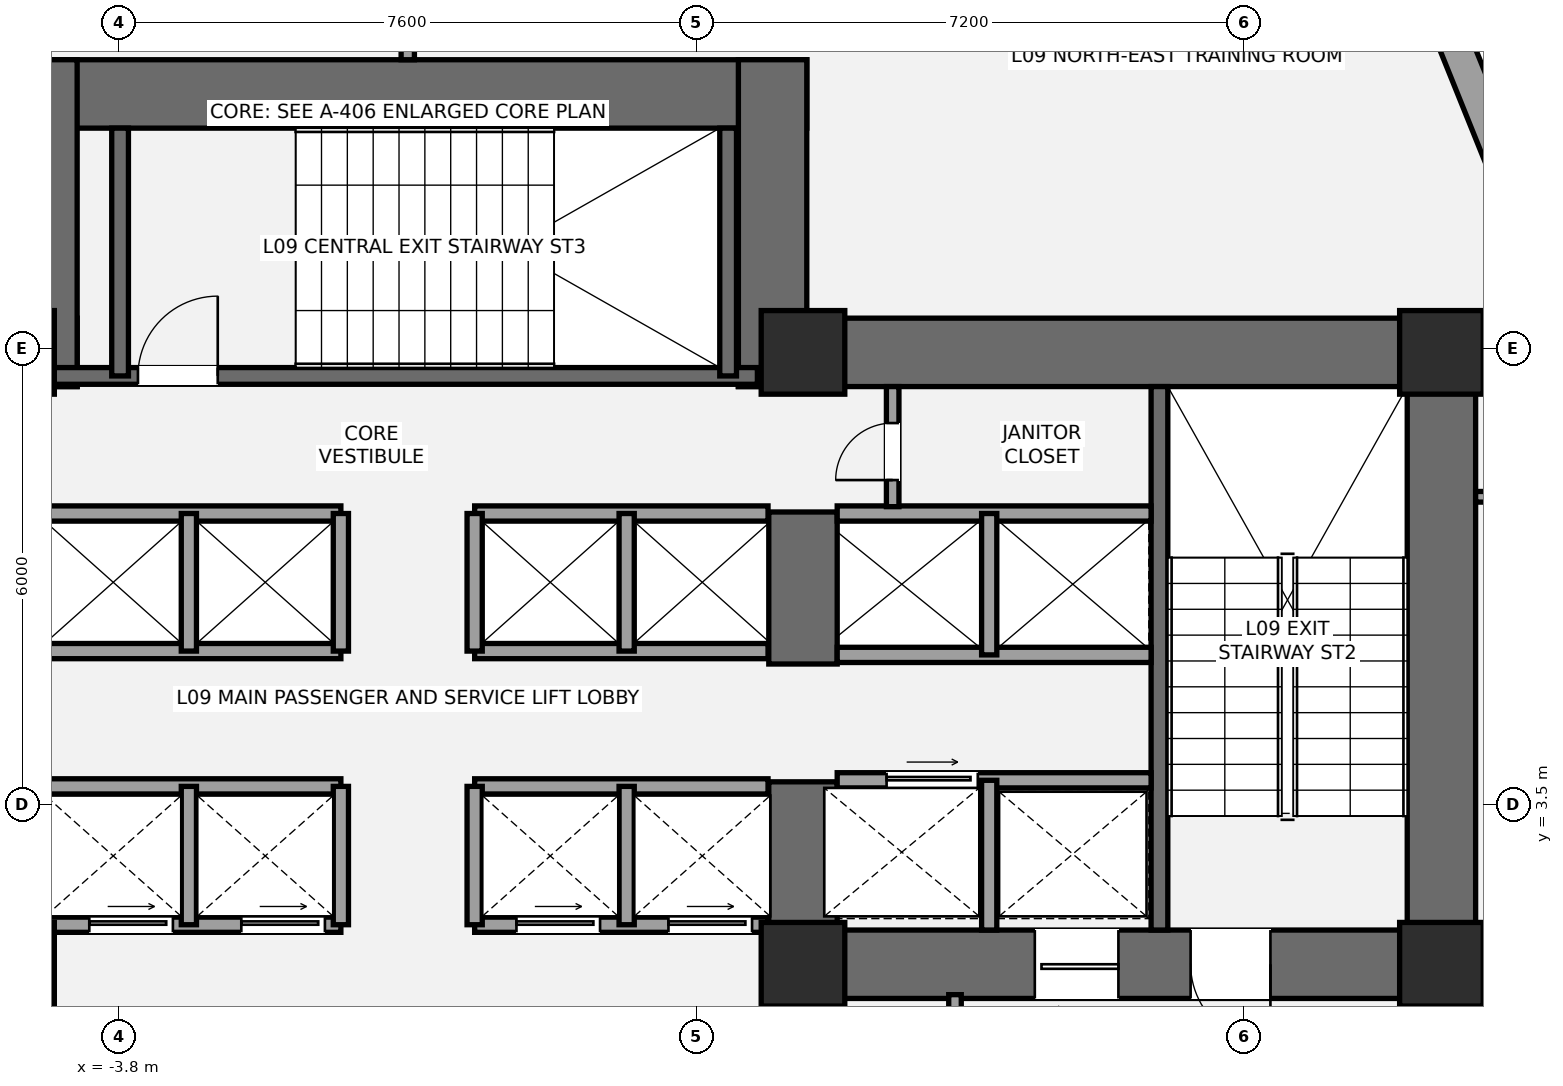
"""IFC4 building model, lengths in metres.
Left out: names, types, materials, properties, quantities, classifications, styles, units other than length and angle.
Written with IfcOpenShell. Run it as: python <this file> out.ifc"""

import sys

from ifc_helpers import new_model, si_unit, direction, frame, frame_2d, origin, origin_2d, place, context, subcontext, project, spatial, rectangle, extrude, element, fill, save


model = new_model("IFC4")
c1 = context("Model", 3, precision=1e-05, world=origin(), true_north=direction((0.0, 1.0)))
c2 = subcontext(c1, "Body", "Model", "MODEL_VIEW")
j1 = project(units=[si_unit("LENGTHUNIT", "METRE"), si_unit("PLANEANGLEUNIT", "RADIAN")], contexts=[c1])
p1 = place(None, origin())
s1 = spatial("IfcSite", under=j1, at=p1, CompositionType="ELEMENT")
p2 = place(p1, origin())
s2 = spatial("IfcBuilding", under=s1, at=p2, CompositionType="ELEMENT")
p3 = place(p2, frame((0.0, 0.0, 37.8)))
s3 = spatial("IfcBuildingStorey", under=s2, at=p3, CompositionType="ELEMENT", Elevation=37.8)
p4 = place(p3, frame((-14.05, 9.45, 0.0), z_axis=(0.0, 0.0, 1.0), x_axis=(1.0, 0.0, 0.0)))
e1 = element("IfcWall", 1, at=p4, inside=s3, PredefinedType="SHEAR", context=c2, shape_type="SweptSolid", body=[
    extrude(rectangle(XDim=9.7, YDim=0.9, at=frame_2d((4.85, 0.0))), origin(), (0.0, 0.0, 1.0), 3.6),
])
p5 = place(p3, frame((13.6, 0.95, 0.0), z_axis=(0.0, 0.0, 1.0), x_axis=(0.0, 1.0, 0.0)))
e2 = element("IfcWall", 2, at=p5, inside=s3, PredefinedType="SHEAR", context=c2, shape_type="SweptSolid", body=[
    extrude(rectangle(XDim=8.95, YDim=0.9, at=frame_2d((4.475, 0.0))), origin(), (0.0, 0.0, 1.0), 3.6),
])
p6 = place(p3, frame((4.35, 9.45, 0.0), z_axis=(0.0, 0.0, 1.0), x_axis=(1.0, 0.0, 0.0)))
e3 = element("IfcWall", 3, at=p6, inside=s3, PredefinedType="SHEAR", context=c2, shape_type="SweptSolid", body=[
    extrude(rectangle(XDim=9.7, YDim=0.9, at=frame_2d((4.85, 0.0))), origin(), (0.0, 0.0, 1.0), 3.6),
])
p7 = place(p3, frame((14.05, 1.4, 0.0), z_axis=(0.0, 0.0, 1.0), x_axis=(-1.0, 0.0, 0.0)))
e4 = element("IfcWall", 4, at=p7, inside=s3, PredefinedType="SHEAR", context=c2, shape_type="SweptSolid", body=[
    extrude(rectangle(XDim=9.3, YDim=0.9, at=frame_2d((4.65, 0.0))), origin(), (0.0, 0.0, 1.0), 3.6),
])
p8 = place(p7, frame((2.7, 0.0, 0.0)))
e5 = element("IfcOpeningElement", 5, at=p8, cuts=e4, PredefinedType="OPENING", context=c2, shape_type="SweptSolid", body=[
    extrude(rectangle(XDim=1.05, YDim=2.15, at=frame_2d((0.525, 1.075))), frame((0.0, 0.46, 0.0), z_axis=(0.0, -1.0, 0.0), x_axis=(1.0, 0.0, 0.0)), (0.0, 0.0, 1.0), 0.92),
])
p9 = place(p7, frame((4.7, 0.0, 0.0)))
e6 = element("IfcOpeningElement", 6, at=p9, cuts=e4, PredefinedType="OPENING", context=c2, shape_type="SweptSolid", body=[
    extrude(rectangle(XDim=1.1, YDim=2.2, at=frame_2d((0.55, 1.1))), frame((0.0, 0.46, 0.0), z_axis=(0.0, -1.0, 0.0), x_axis=(1.0, 0.0, 0.0)), (0.0, 0.0, 1.0), 0.92),
])
p10 = place(p3, frame((5.2, 0.95, 0.0), z_axis=(0.0, 0.0, 1.0), x_axis=(0.0, 1.0, 0.0)))
e7 = element("IfcWall", 7, at=p10, inside=s3, PredefinedType="SHEAR", context=c2, shape_type="SweptSolid", body=[
    extrude(rectangle(XDim=2.85, YDim=0.9, at=frame_2d((1.425, 0.0))), origin(), (0.0, 0.0, 1.0), 3.6),
])
p11 = place(p3, frame((5.2, 5.35, 0.0), z_axis=(0.0, 0.0, 1.0), x_axis=(0.0, 1.0, 0.0)))
e8 = element("IfcWall", 8, at=p11, inside=s3, PredefinedType="SHEAR", context=c2, shape_type="SweptSolid", body=[
    extrude(rectangle(XDim=2.0, YDim=0.9, at=frame_2d((1.0, 0.0))), origin(), (0.0, 0.0, 1.0), 3.6),
])
p12 = place(p3, frame((9.89, 1.85, 0.0), z_axis=(0.0, 0.0, 1.0), x_axis=(0.0, 1.0, 0.0)))
e9 = element("IfcWall", 9, at=p12, inside=s3, PredefinedType="SHEAR", context=c2, shape_type="SweptSolid", body=[
    extrude(rectangle(XDim=7.15, YDim=0.22, at=frame_2d((3.575, 0.0))), origin(), (0.0, 0.0, 1.0), 3.6),
])
p13 = place(p3, frame((-5.25, 12.85, 0.0), z_axis=(0.0, 0.0, 1.0), x_axis=(1.0, 0.0, 0.0)))
e10 = element("IfcWall", 10, at=p13, inside=s3, PredefinedType="SHEAR", context=c2, shape_type="SweptSolid", body=[
    extrude(rectangle(XDim=10.5, YDim=0.9, at=frame_2d((5.25, 0.0))), origin(), (0.0, 0.0, 1.0), 3.6),
])
for number, where, z_axis, x_axis in (
    (11, (-4.8, 9.0, 0.0), (0.0, 0.0, 1.0), (0.0, 1.0, 0.0)),
    (12, (4.8, 9.0, 0.0), (0.0, 0.0, 1.0), (0.0, 1.0, 0.0)),
):
    element("IfcWall", number, at=place(p3, frame(where, z_axis=z_axis, x_axis=x_axis)), inside=s3, PredefinedType="SHEAR", context=c2, shape_type="SweptSolid", body=[
        extrude(rectangle(XDim=4.3, YDim=0.9, at=frame_2d((2.15, 0.0))), origin(), (0.0, 0.0, 1.0), 3.6),
    ])
p14 = place(p3, frame((-4.7, 9.14, 0.0), z_axis=(0.0, 0.0, 1.0), x_axis=(1.0, 0.0, 0.0)))
e13 = element("IfcWall", 13, at=p14, inside=s3, PredefinedType="SHEAR", context=c2, shape_type="SweptSolid", body=[
    extrude(rectangle(XDim=9.3, YDim=0.22, at=frame_2d((4.65, 0.0))), origin(), (0.0, 0.0, 1.0), 3.6),
])
p15 = place(p14, frame((1.15, 0.0, 0.0)))
e14 = element("IfcOpeningElement", 14, at=p15, cuts=e13, PredefinedType="OPENING", context=c2, shape_type="SweptSolid", body=[
    extrude(rectangle(XDim=1.05, YDim=2.15, at=frame_2d((0.525, 1.075))), frame((0.0, 0.12, 0.0), z_axis=(0.0, -1.0, 0.0), x_axis=(1.0, 0.0, 0.0)), (0.0, 0.0, 1.0), 0.24),
])
for number, where, z_axis, x_axis in (
    (15, (-3.785, 9.14, 0.0), (0.0, 0.0, 1.0), (0.0, 1.0, 0.0)),
    (16, (4.215, 9.14, 0.0), (0.0, 0.0, 1.0), (0.0, 1.0, 0.0)),
):
    element("IfcWall", number, at=place(p3, frame(where, z_axis=z_axis, x_axis=x_axis)), inside=s3, PredefinedType="SHEAR", context=c2, shape_type="SweptSolid", body=[
        extrude(rectangle(XDim=3.26, YDim=0.22, at=frame_2d((1.63, 0.0))), origin(), (0.0, 0.0, 1.0), 3.6),
    ])
for number, where, z_axis, x_axis in (
    (17, (-5.2, 1.4, 0.0), (0.0, 0.0, 1.0), (1.0, 0.0, 0.0)),
    (18, (-5.2, 9.45, 0.0), (0.0, 0.0, 1.0), (1.0, 0.0, 0.0)),
    (19, (5.2, 1.4, 0.0), (0.0, 0.0, 1.0), (1.0, 0.0, 0.0)),
    (20, (5.2, 9.45, 0.0), (0.0, 0.0, 1.0), (1.0, 0.0, 0.0)),
    (21, (13.6, 1.4, 0.0), (0.0, 0.0, 1.0), (1.0, 0.0, 0.0)),
    (22, (13.6, 9.45, 0.0), (0.0, 0.0, 1.0), (1.0, 0.0, 0.0)),
):
    element("IfcColumn", number, at=place(p3, frame(where, z_axis=z_axis, x_axis=x_axis)), inside=s3, PredefinedType="COLUMN", context=c2, shape_type="SweptSolid", body=[
        extrude(rectangle(XDim=1.1, YDim=1.1, at=origin_2d()), origin(), (0.0, 0.0, 1.0), 3.6),
    ])
p16 = place(p3, frame((12.681, 16.247, 0.0), z_axis=(0.0, 0.0, 1.0), x_axis=(0.373950808571, -0.927448539149, 0.0)))
e23 = element("IfcWall", 23, at=p16, inside=s3, PredefinedType="STANDARD", context=c2, shape_type="SweptSolid", body=[
    extrude(rectangle(XDim=4.831, YDim=0.44, at=frame_2d((2.416, 0.0))), origin(), (0.0, 0.0, 1.0), 2.533),
])
p17 = place(p3, frame((7.2, -2.15, 0.0), z_axis=(0.0, 0.0, 1.0), x_axis=(0.0, 1.0, 0.0)))
e24 = element("IfcWall", 24, at=p17, inside=s3, PredefinedType="PARTITIONING", context=c2, shape_type="SweptSolid", body=[
    extrude(rectangle(XDim=3.15, YDim=0.165, at=frame_2d((1.575, 0.0))), origin(), (0.0, 0.0, 1.0), 2.853),
])
p18 = place(p3, frame((13.45, -2.15, 0.0), z_axis=(0.0, 0.0, 1.0), x_axis=(0.0, 1.0, 0.0)))
e25 = element("IfcWall", 25, at=p18, inside=s3, PredefinedType="PARTITIONING", context=c2, shape_type="SweptSolid", body=[
    extrude(rectangle(XDim=3.15, YDim=0.165, at=frame_2d((1.575, 0.0))), origin(), (0.0, 0.0, 1.0), 2.853),
])
p19 = place(p18, frame((1.15, 0.0, 0.0)))
e26 = element("IfcOpeningElement", 26, at=p19, cuts=e25, PredefinedType="OPENING", context=c2, shape_type="SweptSolid", body=[
    extrude(rectangle(XDim=1.05, YDim=2.15, at=frame_2d((0.525, 1.075))), frame((0.0, 0.093, 0.0), z_axis=(0.0, -1.0, 0.0), x_axis=(1.0, 0.0, 0.0)), (0.0, 0.0, 1.0), 0.185),
])
p20 = place(p3, frame((4.95, -2.15, 0.0), z_axis=(0.0, 0.0, 1.0), x_axis=(0.0, 1.0, 0.0)))
e27 = element("IfcWall", 27, at=p20, inside=s3, PredefinedType="SOLIDWALL", context=c2, shape_type="SweptSolid", body=[
    extrude(rectangle(XDim=3.15, YDim=0.2, at=frame_2d((1.575, 0.0))), origin(), (0.0, 0.0, 1.0), 3.4),
])
p21 = place(p20, frame((0.95, 0.0, 0.0)))
e28 = element("IfcOpeningElement", 28, at=p21, cuts=e27, PredefinedType="OPENING", context=c2, shape_type="SweptSolid", body=[
    extrude(rectangle(XDim=0.75, YDim=2.1, at=frame_2d((0.375, 1.05))), frame((0.0, 0.11, 0.0), z_axis=(0.0, -1.0, 0.0), x_axis=(1.0, 0.0, 0.0)), (0.0, 0.0, 1.0), 0.22),
])
p22 = place(p3, frame((5.65, 3.82, 0.0), z_axis=(0.0, 0.0, 1.0), x_axis=(1.0, 0.0, 0.0)))
e29 = element("IfcWall", 29, at=p22, inside=s3, PredefinedType="SOLIDWALL", context=c2, shape_type="SweptSolid", body=[
    extrude(rectangle(XDim=4.13, YDim=0.2, at=frame_2d((2.065, 0.0))), origin(), (0.0, 0.0, 1.0), 3.4),
])
p23 = place(p22, frame((0.65, 0.0, 0.0)))
e30 = element("IfcOpeningElement", 30, at=p23, cuts=e29, PredefinedType="OPENING", context=c2, shape_type="SweptSolid", body=[
    extrude(rectangle(XDim=1.2, YDim=2.2, at=frame_2d((0.6, 1.1))), frame((0.0, 0.11, 0.0), z_axis=(0.0, -1.0, 0.0), x_axis=(1.0, 0.0, 0.0)), (0.0, 0.0, 1.0), 0.22),
])
p24 = place(p3, frame((7.65, 1.85, 0.0), z_axis=(0.0, 0.0, 1.0), x_axis=(0.0, 1.0, 0.0)))
e31 = element("IfcWall", 31, at=p24, inside=s3, PredefinedType="SOLIDWALL", context=c2, shape_type="SweptSolid", body=[
    extrude(rectangle(XDim=1.97, YDim=0.2, at=frame_2d((0.985, 0.0))), origin(), (0.0, 0.0, 1.0), 3.4),
])
for number, where, z_axis, x_axis in (
    (32, (5.65, 5.47, 0.0), (0.0, 0.0, 1.0), (1.0, 0.0, 0.0)),
    (33, (5.65, 7.33, 0.0), (0.0, 0.0, 1.0), (1.0, 0.0, 0.0)),
):
    element("IfcWall", number, at=place(p3, frame(where, z_axis=z_axis, x_axis=x_axis)), inside=s3, PredefinedType="SOLIDWALL", context=c2, shape_type="SweptSolid", body=[
        extrude(rectangle(XDim=4.13, YDim=0.2, at=frame_2d((2.065, 0.0))), origin(), (0.0, 0.0, 1.0), 3.4),
    ])
p25 = place(p3, frame((7.65, 5.47, 0.0), z_axis=(0.0, 0.0, 1.0), x_axis=(0.0, 1.0, 0.0)))
e34 = element("IfcWall", 34, at=p25, inside=s3, PredefinedType="SOLIDWALL", context=c2, shape_type="SweptSolid", body=[
    extrude(rectangle(XDim=1.86, YDim=0.2, at=frame_2d((0.93, 0.0))), origin(), (0.0, 0.0, 1.0), 3.4),
])
p26 = place(p3, frame((-4.74, 1.92, 0.0), z_axis=(0.0, 0.0, 1.0), x_axis=(1.0, 0.0, 0.0)))
e35 = element("IfcWall", 35, at=p26, inside=s3, PredefinedType="SOLIDWALL", context=c2, shape_type="SweptSolid", body=[
    extrude(rectangle(XDim=3.86, YDim=0.2, at=frame_2d((1.93, 0.0))), origin(), (0.0, 0.0, 1.0), 2.39),
])
p27 = place(p26, frame((0.55, 0.0, 0.0)))
e36 = element("IfcOpeningElement", 36, at=p27, cuts=e35, PredefinedType="OPENING", context=c2, shape_type="SweptSolid", body=[
    extrude(rectangle(XDim=1.1, YDim=2.2, at=frame_2d((0.55, 1.1))), frame((0.0, 0.11, 0.0), z_axis=(0.0, -1.0, 0.0), x_axis=(1.0, 0.0, 0.0)), (0.0, 0.0, 1.0), 0.22),
])
p28 = place(p26, frame((2.55, 0.0, 0.0)))
e37 = element("IfcOpeningElement", 37, at=p28, cuts=e35, PredefinedType="OPENING", context=c2, shape_type="SweptSolid", body=[
    extrude(rectangle(XDim=1.1, YDim=2.2, at=frame_2d((0.55, 1.1))), frame((0.0, 0.11, 0.0), z_axis=(0.0, -1.0, 0.0), x_axis=(1.0, 0.0, 0.0)), (0.0, 0.0, 1.0), 0.22),
])
p29 = place(p3, frame((0.88, 1.92, 0.0), z_axis=(0.0, 0.0, 1.0), x_axis=(1.0, 0.0, 0.0)))
e38 = element("IfcWall", 38, at=p29, inside=s3, PredefinedType="SOLIDWALL", context=c2, shape_type="SweptSolid", body=[
    extrude(rectangle(XDim=3.86, YDim=0.2, at=frame_2d((1.93, 0.0))), origin(), (0.0, 0.0, 1.0), 2.39),
])
p30 = place(p29, frame((0.55, 0.0, 0.0)))
e39 = element("IfcOpeningElement", 39, at=p30, cuts=e38, PredefinedType="OPENING", context=c2, shape_type="SweptSolid", body=[
    extrude(rectangle(XDim=1.1, YDim=2.2, at=frame_2d((0.55, 1.1))), frame((0.0, 0.11, 0.0), z_axis=(0.0, -1.0, 0.0), x_axis=(1.0, 0.0, 0.0)), (0.0, 0.0, 1.0), 0.22),
])
p31 = place(p29, frame((2.55, 0.0, 0.0)))
e40 = element("IfcOpeningElement", 40, at=p31, cuts=e38, PredefinedType="OPENING", context=c2, shape_type="SweptSolid", body=[
    extrude(rectangle(XDim=1.1, YDim=2.2, at=frame_2d((0.55, 1.1))), frame((0.0, 0.11, 0.0), z_axis=(0.0, -1.0, 0.0), x_axis=(1.0, 0.0, 0.0)), (0.0, 0.0, 1.0), 0.22),
])
for number, where, z_axis, x_axis in (
    (41, (-4.74, 3.74, 0.0), (0.0, 0.0, 1.0), (1.0, 0.0, 0.0)),
    (42, (0.88, 3.74, 0.0), (0.0, 0.0, 1.0), (1.0, 0.0, 0.0)),
):
    element("IfcWall", number, at=place(p3, frame(where, z_axis=z_axis, x_axis=x_axis)), inside=s3, PredefinedType="SOLIDWALL", context=c2, shape_type="SweptSolid", body=[
        extrude(rectangle(XDim=3.86, YDim=0.2, at=frame_2d((1.93, 0.0))), origin(), (0.0, 0.0, 1.0), 3.4),
    ])
for number, where, z_axis, x_axis in (
    (43, (-2.88, 1.92, 0.0), (0.0, 0.0, 1.0), (0.0, 1.0, 0.0)),
    (44, (2.88, 1.92, 0.0), (0.0, 0.0, 1.0), (0.0, 1.0, 0.0)),
    (45, (-0.88, 1.92, 0.0), (0.0, 0.0, 1.0), (0.0, 1.0, 0.0)),
    (46, (0.88, 1.92, 0.0), (0.0, 0.0, 1.0), (0.0, 1.0, 0.0)),
):
    element("IfcWall", number, at=place(p3, frame(where, z_axis=z_axis, x_axis=x_axis)), inside=s3, PredefinedType="SOLIDWALL", context=c2, shape_type="SweptSolid", body=[
        extrude(rectangle(XDim=1.82, YDim=0.2, at=frame_2d((0.91, 0.0))), origin(), (0.0, 0.0, 1.0), 3.4),
    ])
for number, where, z_axis, x_axis in (
    (47, (-4.74, 5.52, 0.0), (0.0, 0.0, 1.0), (1.0, 0.0, 0.0)),
    (48, (0.88, 5.52, 0.0), (0.0, 0.0, 1.0), (1.0, 0.0, 0.0)),
    (49, (-4.74, 7.33, 0.0), (0.0, 0.0, 1.0), (1.0, 0.0, 0.0)),
    (50, (0.88, 7.33, 0.0), (0.0, 0.0, 1.0), (1.0, 0.0, 0.0)),
):
    element("IfcWall", number, at=place(p3, frame(where, z_axis=z_axis, x_axis=x_axis)), inside=s3, PredefinedType="SOLIDWALL", context=c2, shape_type="SweptSolid", body=[
        extrude(rectangle(XDim=3.86, YDim=0.2, at=frame_2d((1.93, 0.0))), origin(), (0.0, 0.0, 1.0), 3.4),
    ])
for number, where, z_axis, x_axis in (
    (51, (-2.88, 5.52, 0.0), (0.0, 0.0, 1.0), (0.0, 1.0, 0.0)),
    (52, (2.88, 5.52, 0.0), (0.0, 0.0, 1.0), (0.0, 1.0, 0.0)),
    (53, (-0.88, 5.52, 0.0), (0.0, 0.0, 1.0), (0.0, 1.0, 0.0)),
    (54, (0.88, 5.52, 0.0), (0.0, 0.0, 1.0), (0.0, 1.0, 0.0)),
):
    element("IfcWall", number, at=place(p3, frame(where, z_axis=z_axis, x_axis=x_axis)), inside=s3, PredefinedType="SOLIDWALL", context=c2, shape_type="SweptSolid", body=[
        extrude(rectangle(XDim=1.81, YDim=0.2, at=frame_2d((0.905, 0.0))), origin(), (0.0, 0.0, 1.0), 3.4),
    ])
p32 = place(p3, frame((6.38, 7.42, 0.0), z_axis=(0.0, 0.0, 1.0), x_axis=(0.0, 1.0, 0.0)))
e55 = element("IfcWall", 55, at=p32, inside=s3, PredefinedType="PARTITIONING", context=c2, shape_type="SweptSolid", body=[
    extrude(rectangle(XDim=1.58, YDim=0.165, at=frame_2d((0.79, 0.0))), origin(), (0.0, 0.0, 1.0), 3.4),
])
p33 = place(p32, frame((0.35, 0.0, 0.0)))
e56 = element("IfcOpeningElement", 56, at=p33, cuts=e55, PredefinedType="OPENING", context=c2, shape_type="SweptSolid", body=[
    extrude(rectangle(XDim=0.75, YDim=2.1, at=frame_2d((0.375, 1.05))), frame((0.0, 0.093, 0.0), z_axis=(0.0, -1.0, 0.0), x_axis=(1.0, 0.0, 0.0)), (0.0, 0.0, 1.0), 0.185),
])
p34 = place(p3, frame((14.05, 7.55, 0.0), z_axis=(0.0, 0.0, 1.0), x_axis=(1.0, 0.0, 0.0)))
e57 = element("IfcWall", 57, at=p34, inside=s3, PredefinedType="PARTITIONING", context=c2, shape_type="SweptSolid", body=[
    extrude(rectangle(XDim=5.753, YDim=0.14, at=frame_2d((2.876, 0.0))), origin(), (0.0, 0.0, 1.0), 2.853),
])
p35 = place(p34, frame((1.2, 0.0, 0.0)))
e58 = element("IfcOpeningElement", 58, at=p35, cuts=e57, PredefinedType="OPENING", context=c2, shape_type="SweptSolid", body=[
    extrude(rectangle(XDim=0.92, YDim=2.15, at=frame_2d((0.46, 1.075))), frame((0.0, 0.08, 0.0), z_axis=(0.0, -1.0, 0.0), x_axis=(1.0, 0.0, 0.0)), (0.0, 0.0, 1.0), 0.16),
])
p36 = place(p3, frame((0.0, 13.3, 0.0), z_axis=(0.0, 0.0, 1.0), x_axis=(0.0, 1.0, 0.0)))
e59 = element("IfcWall", 59, at=p36, inside=s3, PredefinedType="PARTITIONING", context=c2, shape_type="SweptSolid", body=[
    extrude(rectangle(XDim=4.199, YDim=0.175, at=frame_2d((2.1, 0.0))), origin(), (0.0, 0.0, 1.0), 3.4),
])
p37 = place(p8, origin())
e60 = element("IfcDoor", 60, at=p37, inside=s3, OperationType="SINGLE_SWING_LEFT", PredefinedType="DOOR", context=c2, shape_type="SweptSolid", body=[
    extrude(rectangle(XDim=1.05, YDim=2.15, at=frame_2d((0.525, 1.075))), frame((0.0, 0.025, 0.0), z_axis=(0.0, -1.0, 0.0), x_axis=(1.0, 0.0, 0.0)), (0.0, 0.0, 1.0), 0.05),
])
fill(e5, e60)
p38 = place(p15, origin())
e61 = element("IfcDoor", 61, at=p38, inside=s3, OperationType="SINGLE_SWING_RIGHT", PredefinedType="DOOR", context=c2, shape_type="SweptSolid", body=[
    extrude(rectangle(XDim=1.05, YDim=2.15, at=frame_2d((0.525, 1.075))), frame((0.0, 0.025, 0.0), z_axis=(0.0, -1.0, 0.0), x_axis=(1.0, 0.0, 0.0)), (0.0, 0.0, 1.0), 0.05),
])
fill(e14, e61)
p39 = place(p9, origin())
e62 = element("IfcDoor", 62, at=p39, inside=s3, OperationType="SLIDING_TO_LEFT", PredefinedType="DOOR", context=c2, shape_type="SweptSolid", body=[
    extrude(rectangle(XDim=1.1, YDim=2.2, at=frame_2d((0.55, 1.1))), frame((0.0, 0.025, 0.0), z_axis=(0.0, -1.0, 0.0), x_axis=(1.0, 0.0, 0.0)), (0.0, 0.0, 1.0), 0.05),
])
fill(e6, e62)
p40 = place(p23, origin())
e63 = element("IfcDoor", 63, at=p40, inside=s3, OperationType="SLIDING_TO_RIGHT", PredefinedType="DOOR", context=c2, shape_type="SweptSolid", body=[
    extrude(rectangle(XDim=1.2, YDim=2.2, at=frame_2d((0.6, 1.1))), frame((0.0, 0.025, 0.0), z_axis=(0.0, -1.0, 0.0), x_axis=(1.0, 0.0, 0.0)), (0.0, 0.0, 1.0), 0.05),
])
fill(e30, e63)
p41 = place(p27, origin())
e64 = element("IfcDoor", 64, at=p41, inside=s3, OperationType="SLIDING_TO_LEFT", PredefinedType="DOOR", context=c2, shape_type="SweptSolid", body=[
    extrude(rectangle(XDim=1.1, YDim=2.2, at=frame_2d((0.55, 1.1))), frame((0.0, 0.025, 0.0), z_axis=(0.0, -1.0, 0.0), x_axis=(1.0, 0.0, 0.0)), (0.0, 0.0, 1.0), 0.05),
])
fill(e36, e64)
p42 = place(p28, origin())
e65 = element("IfcDoor", 65, at=p42, inside=s3, OperationType="SLIDING_TO_LEFT", PredefinedType="DOOR", context=c2, shape_type="SweptSolid", body=[
    extrude(rectangle(XDim=1.1, YDim=2.2, at=frame_2d((0.55, 1.1))), frame((0.0, 0.025, 0.0), z_axis=(0.0, -1.0, 0.0), x_axis=(1.0, 0.0, 0.0)), (0.0, 0.0, 1.0), 0.05),
])
fill(e37, e65)
p43 = place(p30, origin())
e66 = element("IfcDoor", 66, at=p43, inside=s3, OperationType="SLIDING_TO_LEFT", PredefinedType="DOOR", context=c2, shape_type="SweptSolid", body=[
    extrude(rectangle(XDim=1.1, YDim=2.2, at=frame_2d((0.55, 1.1))), frame((0.0, 0.025, 0.0), z_axis=(0.0, -1.0, 0.0), x_axis=(1.0, 0.0, 0.0)), (0.0, 0.0, 1.0), 0.05),
])
fill(e39, e66)
p44 = place(p31, origin())
e67 = element("IfcDoor", 67, at=p44, inside=s3, OperationType="SLIDING_TO_LEFT", PredefinedType="DOOR", context=c2, shape_type="SweptSolid", body=[
    extrude(rectangle(XDim=1.1, YDim=2.2, at=frame_2d((0.55, 1.1))), frame((0.0, 0.025, 0.0), z_axis=(0.0, -1.0, 0.0), x_axis=(1.0, 0.0, 0.0)), (0.0, 0.0, 1.0), 0.05),
])
fill(e40, e67)
p45 = place(p33, origin())
e68 = element("IfcDoor", 68, at=p45, inside=s3, OperationType="SINGLE_SWING_LEFT", PredefinedType="DOOR", context=c2, shape_type="SweptSolid", body=[
    extrude(rectangle(XDim=0.75, YDim=2.1, at=frame_2d((0.375, 1.05))), frame((0.0, 0.025, 0.0), z_axis=(0.0, -1.0, 0.0), x_axis=(1.0, 0.0, 0.0)), (0.0, 0.0, 1.0), 0.05),
])
fill(e56, e68)
save(model, sys.argv[1])
